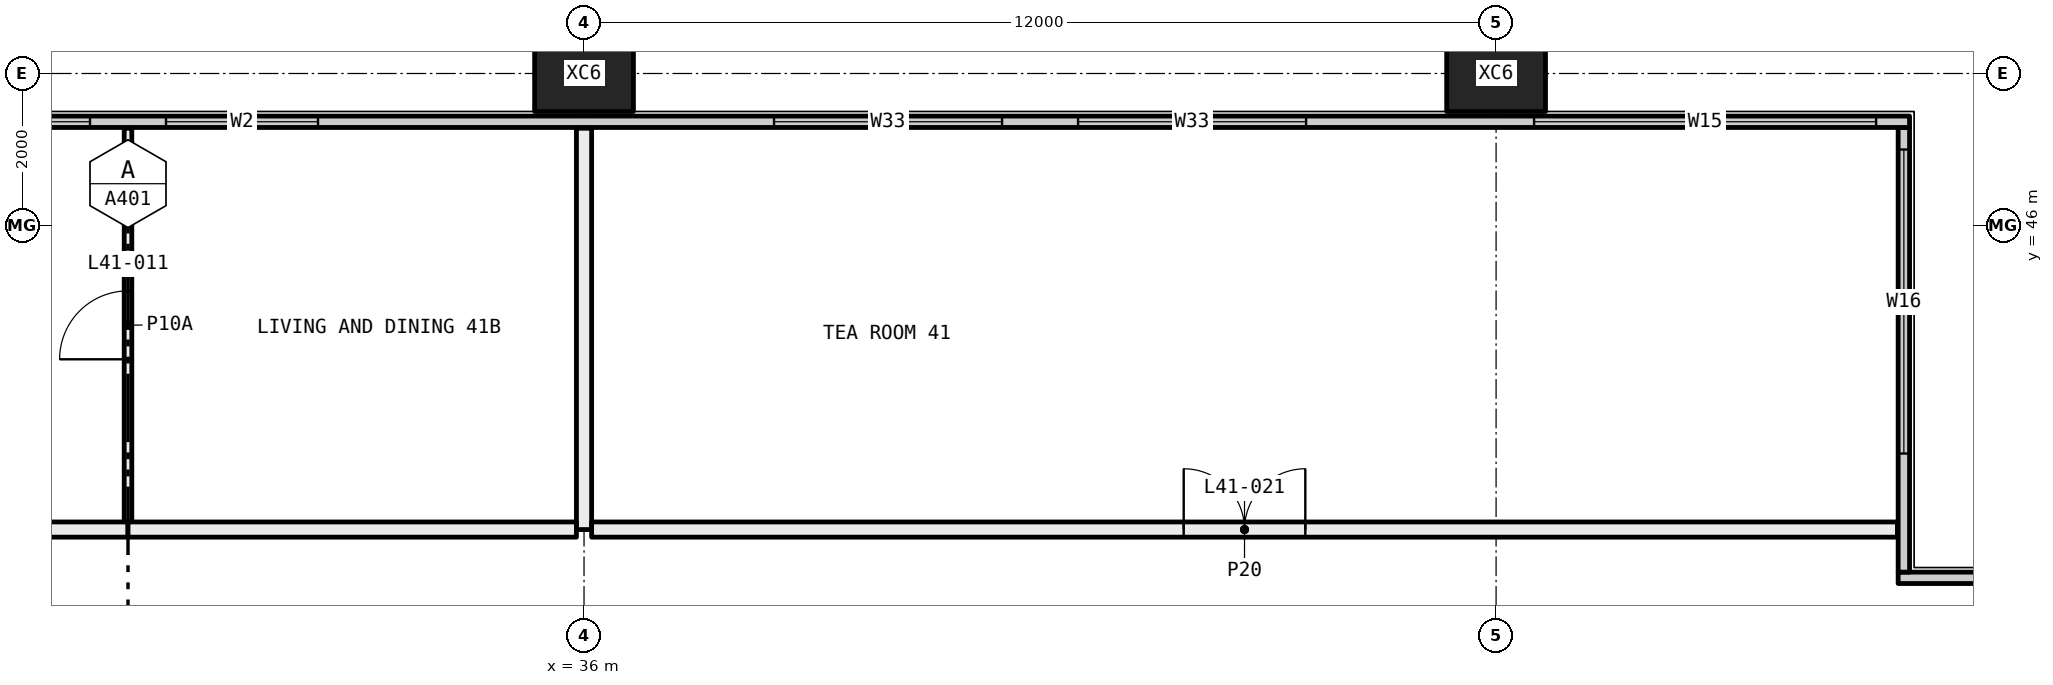
"""IFC4 building model, lengths in metres.
Left out: names, types, materials, properties, quantities, classifications, styles, units other than length and angle.
Written with IfcOpenShell. Run it as: python <this file> out.ifc"""

import sys

from ifc_helpers import new_model, si_unit, direction, frame, frame_2d, origin, origin_2d, place, context, subcontext, project, spatial, rectangle, hollow_rectangle, extrude, element, fill, save


model = new_model("IFC4")
c1 = context("Model", 3, precision=1e-05, world=origin(), true_north=direction((0.0, 1.0)))
c2 = subcontext(c1, "Body", "Model", "MODEL_VIEW")
j1 = project(units=[si_unit("LENGTHUNIT", "METRE"), si_unit("PLANEANGLEUNIT", "RADIAN")], contexts=[c1])
p1 = place(None, origin())
s1 = spatial("IfcSite", under=j1, at=p1, CompositionType="ELEMENT")
p2 = place(p1, origin())
s2 = spatial("IfcBuilding", under=s1, at=p2, CompositionType="ELEMENT")
p3 = place(p2, frame((0.0, 0.0, 158.25)))
s3 = spatial("IfcBuildingStorey", under=s2, at=p3, CompositionType="ELEMENT", Elevation=158.25)
for number, where, z_axis, x_axis in (
    (1, (36.0, 48.0, -0.4), (0.0, 0.0, 1.0), (1.0, 0.0, 0.0)),
    (2, (48.0, 48.0, -0.4), (0.0, 0.0, 1.0), (1.0, 0.0, 0.0)),
):
    element("IfcColumn", number, at=place(p3, frame(where, z_axis=z_axis, x_axis=x_axis)), inside=s3, PredefinedType="COLUMN", context=c2, shape_type="SweptSolid", body=[
        extrude(hollow_rectangle(XDim=1.3, YDim=1.0, WallThickness=0.05, at=origin_2d()), origin(), (0.0, 0.0, 1.0), 3.45),
    ])
p4 = place(p3, frame((53.29, 41.365, 0.0), z_axis=(0.0, 0.0, 1.0), x_axis=(1.0, 0.0, 0.0)))
e3 = element("IfcWall", 3, at=p4, inside=s3, PredefinedType="ELEMENTEDWALL", context=c2, shape_type="SweptSolid", body=[
    extrude(rectangle(XDim=6.15, YDim=0.15, at=frame_2d((3.075, 0.0))), origin(), (0.0, 0.0, 1.0), 3.05),
])
p5 = place(p4, frame((1.71, 0.0, 0.45)))
e4 = element("IfcOpeningElement", 4, at=p5, cuts=e3, PredefinedType="OPENING", context=c2, shape_type="SweptSolid", body=[
    extrude(rectangle(XDim=4.0, YDim=2.55, at=frame_2d((2.0, 1.275))), frame((0.0, 0.085, 0.0), z_axis=(0.0, -1.0, 0.0), x_axis=(1.0, 0.0, 0.0)), (0.0, 0.0, 1.0), 0.17),
])
p6 = place(p3, frame((53.365, 41.44, 0.0), z_axis=(0.0, 0.0, 1.0), x_axis=(0.0, 1.0, 0.0)))
e5 = element("IfcWall", 5, at=p6, inside=s3, PredefinedType="ELEMENTEDWALL", context=c2, shape_type="SweptSolid", body=[
    extrude(rectangle(XDim=5.85, YDim=0.15, at=frame_2d((2.925, 0.0))), origin(), (0.0, 0.0, 1.0), 3.05),
])
p7 = place(p6, frame((1.56, 0.0, 0.45)))
e6 = element("IfcOpeningElement", 6, at=p7, cuts=e5, PredefinedType="OPENING", context=c2, shape_type="SweptSolid", body=[
    extrude(rectangle(XDim=4.0, YDim=2.55, at=frame_2d((2.0, 1.275))), frame((0.0, 0.085, 0.0), z_axis=(0.0, -1.0, 0.0), x_axis=(1.0, 0.0, 0.0)), (0.0, 0.0, 1.0), 0.17),
])
p8 = place(p3, frame((6.56, 47.365, 0.0), z_axis=(0.0, 0.0, 1.0), x_axis=(1.0, 0.0, 0.0)))
e7 = element("IfcWall", 7, at=p8, inside=s3, PredefinedType="ELEMENTEDWALL", context=c2, shape_type="SweptSolid", body=[
    extrude(rectangle(XDim=46.88, YDim=0.15, at=frame_2d((23.44, 0.0))), origin(), (0.0, 0.0, 1.0), 3.05),
])
p9 = place(p8, frame((0.44, 0.0, 0.45)))
e8 = element("IfcOpeningElement", 8, at=p9, cuts=e7, PredefinedType="OPENING", context=c2, shape_type="SweptSolid", body=[
    extrude(rectangle(XDim=4.5, YDim=2.55, at=frame_2d((2.25, 1.275))), frame((0.0, 0.085, 0.0), z_axis=(0.0, -1.0, 0.0), x_axis=(1.0, 0.0, 0.0)), (0.0, 0.0, 1.0), 0.17),
])
p10 = place(p8, frame((7.94, 0.0, 0.45)))
e9 = element("IfcOpeningElement", 9, at=p10, cuts=e7, PredefinedType="OPENING", context=c2, shape_type="SweptSolid", body=[
    extrude(rectangle(XDim=3.0, YDim=2.55, at=frame_2d((1.5, 1.275))), frame((0.0, 0.085, 0.0), z_axis=(0.0, -1.0, 0.0), x_axis=(1.0, 0.0, 0.0)), (0.0, 0.0, 1.0), 0.17),
])
p11 = place(p8, frame((11.94, 0.0, 0.45)))
e10 = element("IfcOpeningElement", 10, at=p11, cuts=e7, PredefinedType="OPENING", context=c2, shape_type="SweptSolid", body=[
    extrude(rectangle(XDim=3.0, YDim=2.55, at=frame_2d((1.5, 1.275))), frame((0.0, 0.085, 0.0), z_axis=(0.0, -1.0, 0.0), x_axis=(1.0, 0.0, 0.0)), (0.0, 0.0, 1.0), 0.17),
])
p12 = place(p8, frame((19.94, 0.0, 0.45)))
e11 = element("IfcOpeningElement", 11, at=p12, cuts=e7, PredefinedType="OPENING", context=c2, shape_type="SweptSolid", body=[
    extrude(rectangle(XDim=3.0, YDim=2.55, at=frame_2d((1.5, 1.275))), frame((0.0, 0.085, 0.0), z_axis=(0.0, -1.0, 0.0), x_axis=(1.0, 0.0, 0.0)), (0.0, 0.0, 1.0), 0.17),
])
p13 = place(p8, frame((23.94, 0.0, 0.45)))
e12 = element("IfcOpeningElement", 12, at=p13, cuts=e7, PredefinedType="OPENING", context=c2, shape_type="SweptSolid", body=[
    extrude(rectangle(XDim=2.0, YDim=2.55, at=frame_2d((1.0, 1.275))), frame((0.0, 0.085, 0.0), z_axis=(0.0, -1.0, 0.0), x_axis=(1.0, 0.0, 0.0)), (0.0, 0.0, 1.0), 0.17),
])
p14 = place(p8, frame((31.94, 0.0, 0.45)))
e13 = element("IfcOpeningElement", 13, at=p14, cuts=e7, PredefinedType="OPENING", context=c2, shape_type="SweptSolid", body=[
    extrude(rectangle(XDim=3.0, YDim=2.55, at=frame_2d((1.5, 1.275))), frame((0.0, 0.085, 0.0), z_axis=(0.0, -1.0, 0.0), x_axis=(1.0, 0.0, 0.0)), (0.0, 0.0, 1.0), 0.17),
])
p15 = place(p8, frame((35.94, 0.0, 0.45)))
e14 = element("IfcOpeningElement", 14, at=p15, cuts=e7, PredefinedType="OPENING", context=c2, shape_type="SweptSolid", body=[
    extrude(rectangle(XDim=3.0, YDim=2.55, at=frame_2d((1.5, 1.275))), frame((0.0, 0.085, 0.0), z_axis=(0.0, -1.0, 0.0), x_axis=(1.0, 0.0, 0.0)), (0.0, 0.0, 1.0), 0.17),
])
p16 = place(p8, frame((41.94, 0.0, 0.45)))
e15 = element("IfcOpeningElement", 15, at=p16, cuts=e7, PredefinedType="OPENING", context=c2, shape_type="SweptSolid", body=[
    extrude(rectangle(XDim=4.5, YDim=2.55, at=frame_2d((2.25, 1.275))), frame((0.0, 0.085, 0.0), z_axis=(0.0, -1.0, 0.0), x_axis=(1.0, 0.0, 0.0)), (0.0, 0.0, 1.0), 0.17),
])
p17 = place(p3, frame((30.0, 42.1, 0.0), z_axis=(0.0, 0.0, 1.0), x_axis=(0.0, 1.0, 0.0)))
e16 = element("IfcWall", 16, at=p17, inside=s3, PredefinedType="PARTITIONING", context=c2, shape_type="SweptSolid", body=[
    extrude(rectangle(XDim=5.18, YDim=0.1, at=frame_2d((2.59, 0.0))), origin(), (0.0, 0.0, 1.0), 3.05),
])
p18 = place(p17, frame((2.14, 0.0, 0.0)))
e17 = element("IfcOpeningElement", 17, at=p18, cuts=e16, PredefinedType="OPENING", context=c2, shape_type="SweptSolid", body=[
    extrude(rectangle(XDim=0.9, YDim=2.1, at=frame_2d((0.45, 1.05))), frame((0.0, 0.06, 0.0), z_axis=(0.0, -1.0, 0.0), x_axis=(1.0, 0.0, 0.0)), (0.0, 0.0, 1.0), 0.12),
])
p19 = place(p3, frame((24.0, 42.0, 0.0), z_axis=(0.0, 0.0, 1.0), x_axis=(1.0, 0.0, 0.0)))
e18 = element("IfcWall", 18, at=p19, inside=s3, PredefinedType="PARTITIONING", context=c2, shape_type="SweptSolid", body=[
    extrude(rectangle(XDim=6.0, YDim=0.2, at=frame_2d((3.0, 0.0))), origin(), (0.0, 0.0, 1.0), 3.05),
])
p20 = place(p3, frame((36.0, 42.0, 0.0), z_axis=(0.0, 0.0, 1.0), x_axis=(0.0, 1.0, 0.0)))
e19 = element("IfcWall", 19, at=p20, inside=s3, PredefinedType="PARTITIONING", context=c2, shape_type="SweptSolid", body=[
    extrude(rectangle(XDim=5.28, YDim=0.2, at=frame_2d((2.64, 0.0))), origin(), (0.0, 0.0, 1.0), 2.45),
])
p21 = place(p3, frame((30.0, 42.0, 0.0), z_axis=(0.0, 0.0, 1.0), x_axis=(1.0, 0.0, 0.0)))
e20 = element("IfcWall", 20, at=p21, inside=s3, PredefinedType="PARTITIONING", context=c2, shape_type="SweptSolid", body=[
    extrude(rectangle(XDim=5.9, YDim=0.2, at=frame_2d((2.95, 0.0))), origin(), (0.0, 0.0, 1.0), 3.05),
])
p22 = place(p3, frame((36.1, 42.0, 0.0), z_axis=(0.0, 0.0, 1.0), x_axis=(1.0, 0.0, 0.0)))
e21 = element("IfcWall", 21, at=p22, inside=s3, PredefinedType="PARTITIONING", context=c2, shape_type="SweptSolid", body=[
    extrude(rectangle(XDim=17.18, YDim=0.2, at=frame_2d((8.59, 0.0))), origin(), (0.0, 0.0, 1.0), 3.05),
])
p23 = place(p22, frame((7.79, 0.0, 0.0)))
e22 = element("IfcOpeningElement", 22, at=p23, cuts=e21, PredefinedType="OPENING", context=c2, shape_type="SweptSolid", body=[
    extrude(rectangle(XDim=1.6, YDim=2.1, at=frame_2d((0.8, 1.05))), frame((0.0, 0.11, 0.0), z_axis=(0.0, -1.0, 0.0), x_axis=(1.0, 0.0, 0.0)), (0.0, 0.0, 1.0), 0.22),
])
p24 = place(p7, origin())
e23 = element("IfcWindow", 23, at=p24, inside=s3, PartitioningType="SINGLE_PANEL", PredefinedType="WINDOW", context=c2, shape_type="SweptSolid", body=[
    extrude(rectangle(XDim=4.0, YDim=2.55, at=frame_2d((2.0, 1.275))), frame((0.0, 0.03, 0.0), z_axis=(0.0, -1.0, 0.0), x_axis=(1.0, 0.0, 0.0)), (0.0, 0.0, 1.0), 0.06),
])
fill(e6, e23)
p25 = place(p12, origin())
e24 = element("IfcWindow", 24, at=p25, inside=s3, PartitioningType="SINGLE_PANEL", PredefinedType="WINDOW", context=c2, shape_type="SweptSolid", body=[
    extrude(rectangle(XDim=3.0, YDim=2.55, at=frame_2d((1.5, 1.275))), frame((0.0, 0.03, 0.0), z_axis=(0.0, -1.0, 0.0), x_axis=(1.0, 0.0, 0.0)), (0.0, 0.0, 1.0), 0.06),
])
fill(e11, e24)
p26 = place(p13, origin())
e25 = element("IfcWindow", 25, at=p26, inside=s3, PartitioningType="SINGLE_PANEL", PredefinedType="WINDOW", context=c2, shape_type="SweptSolid", body=[
    extrude(rectangle(XDim=2.0, YDim=2.55, at=frame_2d((1.0, 1.275))), frame((0.0, 0.03, 0.0), z_axis=(0.0, -1.0, 0.0), x_axis=(1.0, 0.0, 0.0)), (0.0, 0.0, 1.0), 0.06),
])
fill(e12, e25)
p27 = place(p14, origin())
e26 = element("IfcWindow", 26, at=p27, inside=s3, PartitioningType="SINGLE_PANEL", PredefinedType="WINDOW", context=c2, shape_type="SweptSolid", body=[
    extrude(rectangle(XDim=3.0, YDim=2.55, at=frame_2d((1.5, 1.275))), frame((0.0, 0.03, 0.0), z_axis=(0.0, -1.0, 0.0), x_axis=(1.0, 0.0, 0.0)), (0.0, 0.0, 1.0), 0.06),
])
fill(e13, e26)
p28 = place(p15, origin())
e27 = element("IfcWindow", 27, at=p28, inside=s3, PartitioningType="SINGLE_PANEL", PredefinedType="WINDOW", context=c2, shape_type="SweptSolid", body=[
    extrude(rectangle(XDim=3.0, YDim=2.55, at=frame_2d((1.5, 1.275))), frame((0.0, 0.03, 0.0), z_axis=(0.0, -1.0, 0.0), x_axis=(1.0, 0.0, 0.0)), (0.0, 0.0, 1.0), 0.06),
])
fill(e14, e27)
p29 = place(p16, origin())
e28 = element("IfcWindow", 28, at=p29, inside=s3, PartitioningType="SINGLE_PANEL", PredefinedType="WINDOW", context=c2, shape_type="SweptSolid", body=[
    extrude(rectangle(XDim=4.5, YDim=2.55, at=frame_2d((2.25, 1.275))), frame((0.0, 0.03, 0.0), z_axis=(0.0, -1.0, 0.0), x_axis=(1.0, 0.0, 0.0)), (0.0, 0.0, 1.0), 0.06),
])
fill(e15, e28)
p30 = place(p18, origin())
e29 = element("IfcDoor", 29, at=p30, inside=s3, OperationType="SINGLE_SWING_RIGHT", PredefinedType="DOOR", context=c2, shape_type="SweptSolid", body=[
    extrude(rectangle(XDim=0.9, YDim=2.1, at=frame_2d((0.45, 1.05))), frame((0.0, 0.025, 0.0), z_axis=(0.0, -1.0, 0.0), x_axis=(1.0, 0.0, 0.0)), (0.0, 0.0, 1.0), 0.05),
])
fill(e17, e29)
p31 = place(p23, origin())
e30 = element("IfcDoor", 30, at=p31, inside=s3, OperationType="DOUBLE_DOOR_SINGLE_SWING", PredefinedType="DOOR", context=c2, shape_type="SweptSolid", body=[
    extrude(rectangle(XDim=1.6, YDim=2.1, at=frame_2d((0.8, 1.05))), frame((0.0, 0.025, 0.0), z_axis=(0.0, -1.0, 0.0), x_axis=(1.0, 0.0, 0.0)), (0.0, 0.0, 1.0), 0.05),
])
fill(e22, e30)
save(model, sys.argv[1])
